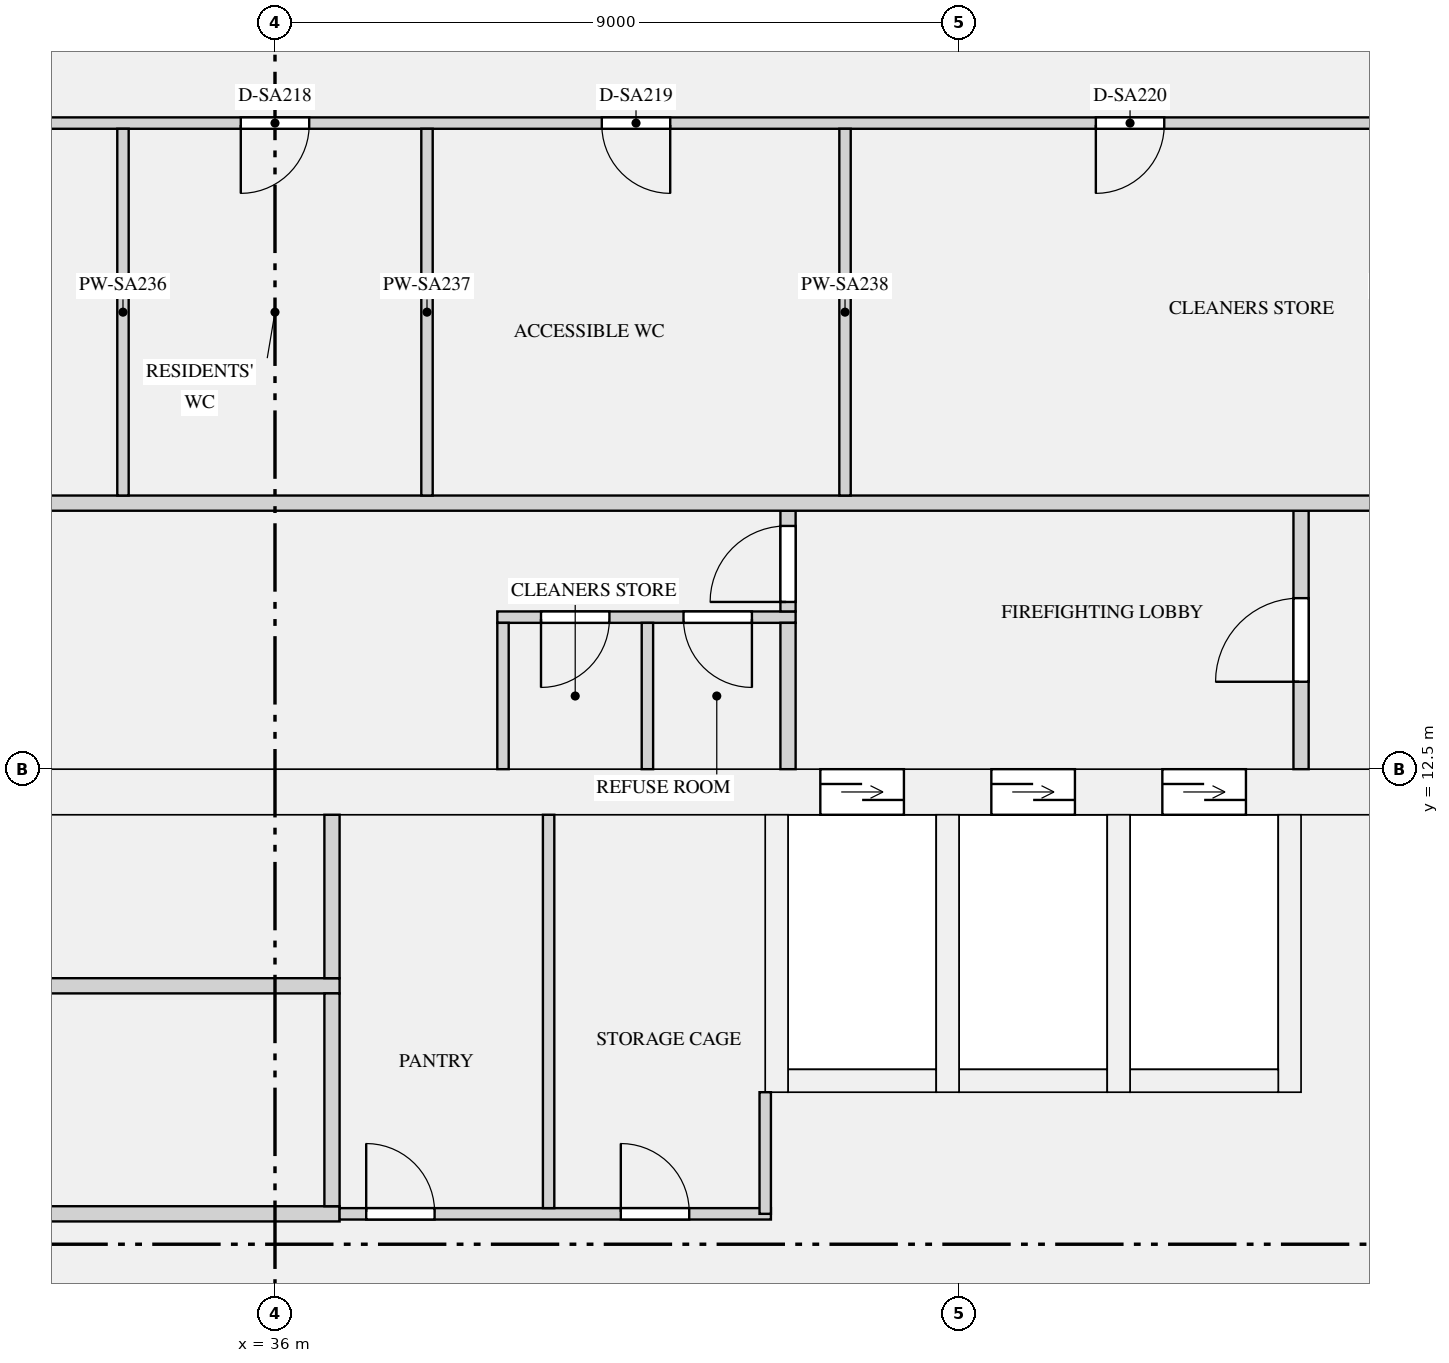
"""IFC4 building model, lengths in metres.
Left out: names, types, materials, properties, quantities, classifications, styles, units other than length and angle.
Written with IfcOpenShell. Run it as: python <this file> out.ifc"""

import sys

from ifc_helpers import new_model, si_unit, direction, frame, frame_2d, origin, place, context, subcontext, project, spatial, rectangle, extrude, element, fill, save


model = new_model("IFC4")
c1 = context("Model", 3, precision=1e-05, world=origin(), true_north=direction((0.0, 1.0)))
c2 = subcontext(c1, "Body", "Model", "MODEL_VIEW")
j1 = project(units=[si_unit("LENGTHUNIT", "METRE"), si_unit("PLANEANGLEUNIT", "RADIAN")], contexts=[c1])
p1 = place(None, origin())
s1 = spatial("IfcSite", under=j1, at=p1, CompositionType="ELEMENT")
p2 = place(p1, origin())
s2 = spatial("IfcBuilding", under=s1, at=p2, CompositionType="ELEMENT")
p3 = place(p2, frame((0.0, 0.0, 191.7)))
s3 = spatial("IfcBuildingStorey", under=s2, at=p3, CompositionType="ELEMENT", Elevation=191.7)
p4 = place(p3, frame((18.6, 12.2, 0.0), z_axis=(0.0, 0.0, 1.0), x_axis=(1.0, 0.0, 0.0)))
e1 = element("IfcWall", 1, at=p4, inside=s3, PredefinedType="SHEAR", context=c2, shape_type="SweptSolid", body=[
    extrude(rectangle(XDim=34.8, YDim=0.6, at=frame_2d((17.4, 0.0))), origin(), (0.0, 0.0, 1.0), 6.3),
])
p5 = place(p4, frame((24.575, 0.0, 0.0)))
e2 = element("IfcOpeningElement", 2, at=p5, cuts=e1, PredefinedType="OPENING", context=c2, shape_type="SweptSolid", body=[
    extrude(rectangle(XDim=1.1, YDim=2.1, at=frame_2d((0.55, 1.05))), frame((0.0, 0.31, 0.0), z_axis=(0.0, -1.0, 0.0), x_axis=(1.0, 0.0, 0.0)), (0.0, 0.0, 1.0), 0.62),
])
p6 = place(p4, frame((26.825, 0.0, 0.0)))
e3 = element("IfcOpeningElement", 3, at=p6, cuts=e1, PredefinedType="OPENING", context=c2, shape_type="SweptSolid", body=[
    extrude(rectangle(XDim=1.1, YDim=2.1, at=frame_2d((0.55, 1.05))), frame((0.0, 0.31, 0.0), z_axis=(0.0, -1.0, 0.0), x_axis=(1.0, 0.0, 0.0)), (0.0, 0.0, 1.0), 0.62),
])
p7 = place(p4, frame((29.075, 0.0, 0.0)))
e4 = element("IfcOpeningElement", 4, at=p7, cuts=e1, PredefinedType="OPENING", context=c2, shape_type="SweptSolid", body=[
    extrude(rectangle(XDim=1.1, YDim=2.1, at=frame_2d((0.55, 1.05))), frame((0.0, 0.31, 0.0), z_axis=(0.0, -1.0, 0.0), x_axis=(1.0, 0.0, 0.0)), (0.0, 0.0, 1.0), 0.62),
])
p8 = place(p4, frame((4.65, 0.0, 0.0)))
e5 = element("IfcOpeningElement", 5, at=p8, cuts=e1, PredefinedType="OPENING", context=c2, shape_type="SweptSolid", body=[
    extrude(rectangle(XDim=0.9, YDim=2.1, at=frame_2d((0.45, 1.05))), frame((0.0, 0.31, 0.0), z_axis=(0.0, -1.0, 0.0), x_axis=(1.0, 0.0, 0.0)), (0.0, 0.0, 1.0), 0.62),
])
p9 = place(p4, frame((1.55, 0.0, 0.0)))
e6 = element("IfcOpeningElement", 6, at=p9, cuts=e1, PredefinedType="OPENING", context=c2, shape_type="SweptSolid", body=[
    extrude(rectangle(XDim=1.2, YDim=2.1, at=frame_2d((0.6, 1.05))), frame((0.0, 0.31, 0.0), z_axis=(0.0, -1.0, 0.0), x_axis=(1.0, 0.0, 0.0)), (0.0, 0.0, 1.0), 0.62),
])
p10 = place(p4, frame((32.05, 0.0, 0.0)))
e7 = element("IfcOpeningElement", 7, at=p10, cuts=e1, PredefinedType="OPENING", context=c2, shape_type="SweptSolid", body=[
    extrude(rectangle(XDim=1.2, YDim=2.1, at=frame_2d((0.6, 1.05))), frame((0.0, 0.31, 0.0), z_axis=(0.0, -1.0, 0.0), x_axis=(1.0, 0.0, 0.0)), (0.0, 0.0, 1.0), 0.62),
])
p11 = place(p3, frame((42.75, 8.4, 0.0), z_axis=(0.0, 0.0, 1.0), x_axis=(1.0, 0.0, 0.0)))
e8 = element("IfcWall", 8, at=p11, inside=s3, PredefinedType="SHEAR", context=c2, shape_type="SweptSolid", body=[
    extrude(rectangle(XDim=1.95, YDim=0.3, at=frame_2d((0.975, 0.0))), origin(), (0.0, 0.0, 1.0), 6.3),
])
p12 = place(p3, frame((42.6, 8.25, 0.0), z_axis=(0.0, 0.0, 1.0), x_axis=(0.0, 1.0, 0.0)))
e9 = element("IfcWall", 9, at=p12, inside=s3, PredefinedType="SHEAR", context=c2, shape_type="SweptSolid", body=[
    extrude(rectangle(XDim=3.65, YDim=0.3, at=frame_2d((1.825, 0.0))), origin(), (0.0, 0.0, 1.0), 6.3),
])
p13 = place(p3, frame((45.0, 8.4, 0.0), z_axis=(0.0, 0.0, 1.0), x_axis=(1.0, 0.0, 0.0)))
e10 = element("IfcWall", 10, at=p13, inside=s3, PredefinedType="SHEAR", context=c2, shape_type="SweptSolid", body=[
    extrude(rectangle(XDim=1.95, YDim=0.3, at=frame_2d((0.975, 0.0))), origin(), (0.0, 0.0, 1.0), 6.3),
])
p14 = place(p3, frame((44.85, 8.25, 0.0), z_axis=(0.0, 0.0, 1.0), x_axis=(0.0, 1.0, 0.0)))
e11 = element("IfcWall", 11, at=p14, inside=s3, PredefinedType="SHEAR", context=c2, shape_type="SweptSolid", body=[
    extrude(rectangle(XDim=3.65, YDim=0.3, at=frame_2d((1.825, 0.0))), origin(), (0.0, 0.0, 1.0), 6.3),
])
p15 = place(p3, frame((47.25, 8.4, 0.0), z_axis=(0.0, 0.0, 1.0), x_axis=(1.0, 0.0, 0.0)))
e12 = element("IfcWall", 12, at=p15, inside=s3, PredefinedType="SHEAR", context=c2, shape_type="SweptSolid", body=[
    extrude(rectangle(XDim=1.95, YDim=0.3, at=frame_2d((0.975, 0.0))), origin(), (0.0, 0.0, 1.0), 6.3),
])
for number, where, z_axis, x_axis in (
    (13, (47.1, 8.25, 0.0), (0.0, 0.0, 1.0), (0.0, 1.0, 0.0)),
    (14, (49.35, 8.25, 0.0), (0.0, 0.0, 1.0), (0.0, 1.0, 0.0)),
):
    element("IfcWall", number, at=place(p3, frame(where, z_axis=z_axis, x_axis=x_axis)), inside=s3, PredefinedType="SHEAR", context=c2, shape_type="SweptSolid", body=[
        extrude(rectangle(XDim=3.65, YDim=0.3, at=frame_2d((1.825, 0.0))), origin(), (0.0, 0.0, 1.0), 6.3),
    ])
p16 = place(p3, frame((22.7, 6.65, 0.0), z_axis=(0.0, 0.0, 1.0), x_axis=(1.0, 0.0, 0.0)))
e15 = element("IfcWall", 15, at=p16, inside=s3, PredefinedType="PARTITIONING", context=c2, shape_type="SweptSolid", body=[
    extrude(rectangle(XDim=14.15, YDim=0.2, at=frame_2d((7.075, 0.0))), origin(), (0.0, 0.0, 1.0), 5.98),
])
p17 = place(p16, frame((0.55, 0.0, 0.0)))
e16 = element("IfcOpeningElement", 16, at=p17, cuts=e15, PredefinedType="OPENING", context=c2, shape_type="SweptSolid", body=[
    extrude(rectangle(XDim=0.9, YDim=2.1, at=frame_2d((0.45, 1.05))), frame((0.0, 0.11, 0.0), z_axis=(0.0, -1.0, 0.0), x_axis=(1.0, 0.0, 0.0)), (0.0, 0.0, 1.0), 0.22),
])
p18 = place(p3, frame((36.85, 6.65, 0.0), z_axis=(0.0, 0.0, 1.0), x_axis=(1.0, 0.0, 0.0)))
e17 = element("IfcWall", 17, at=p18, inside=s3, PredefinedType="PARTITIONING", context=c2, shape_type="SweptSolid", body=[
    extrude(rectangle(XDim=5.675, YDim=0.15, at=frame_2d((2.837, 0.0))), origin(), (0.0, 0.0, 1.0), 5.98),
])
p19 = place(p18, frame((0.35, 0.0, 0.0)))
e18 = element("IfcOpeningElement", 18, at=p19, cuts=e17, PredefinedType="OPENING", context=c2, shape_type="SweptSolid", body=[
    extrude(rectangle(XDim=0.9, YDim=2.1, at=frame_2d((0.45, 1.05))), frame((0.0, 0.085, 0.0), z_axis=(0.0, -1.0, 0.0), x_axis=(1.0, 0.0, 0.0)), (0.0, 0.0, 1.0), 0.17),
])
p20 = place(p18, frame((3.7, 0.0, 0.0)))
e19 = element("IfcOpeningElement", 19, at=p20, cuts=e17, PredefinedType="OPENING", context=c2, shape_type="SweptSolid", body=[
    extrude(rectangle(XDim=0.9, YDim=2.1, at=frame_2d((0.45, 1.05))), frame((0.0, 0.085, 0.0), z_axis=(0.0, -1.0, 0.0), x_axis=(1.0, 0.0, 0.0)), (0.0, 0.0, 1.0), 0.17),
])
p21 = place(p3, frame((22.7, 9.65, 0.0), z_axis=(0.0, 0.0, 1.0), x_axis=(1.0, 0.0, 0.0)))
e20 = element("IfcWall", 20, at=p21, inside=s3, PredefinedType="PARTITIONING", context=c2, shape_type="SweptSolid", body=[
    extrude(rectangle(XDim=14.15, YDim=0.2, at=frame_2d((7.075, 0.0))), origin(), (0.0, 0.0, 1.0), 5.98),
])
p22 = place(p3, frame((38.925, 14.5, 0.0), z_axis=(0.0, 0.0, 1.0), x_axis=(1.0, 0.0, 0.0)))
e21 = element("IfcWall", 21, at=p22, inside=s3, PredefinedType="PARTITIONING", context=c2, shape_type="SweptSolid", body=[
    extrude(rectangle(XDim=3.925, YDim=0.15, at=frame_2d((1.962, 0.0))), origin(), (0.0, 0.0, 1.0), 5.98),
])
p23 = place(p22, frame((0.575, 0.0, 0.0)))
e22 = element("IfcOpeningElement", 22, at=p23, cuts=e21, PredefinedType="OPENING", context=c2, shape_type="SweptSolid", body=[
    extrude(rectangle(XDim=0.9, YDim=2.1, at=frame_2d((0.45, 1.05))), frame((0.0, 0.085, 0.0), z_axis=(0.0, -1.0, 0.0), x_axis=(1.0, 0.0, 0.0)), (0.0, 0.0, 1.0), 0.17),
])
p24 = place(p22, frame((2.45, 0.0, 0.0)))
e23 = element("IfcOpeningElement", 23, at=p24, cuts=e21, PredefinedType="OPENING", context=c2, shape_type="SweptSolid", body=[
    extrude(rectangle(XDim=0.9, YDim=2.1, at=frame_2d((0.45, 1.05))), frame((0.0, 0.085, 0.0), z_axis=(0.0, -1.0, 0.0), x_axis=(1.0, 0.0, 0.0)), (0.0, 0.0, 1.0), 0.17),
])
p25 = place(p3, frame((42.45, 6.65, 0.0), z_axis=(0.0, 0.0, 1.0), x_axis=(0.0, 1.0, 0.0)))
e24 = element("IfcWall", 24, at=p25, inside=s3, PredefinedType="PARTITIONING", context=c2, shape_type="SweptSolid", body=[
    extrude(rectangle(XDim=1.6, YDim=0.15, at=frame_2d((0.8, 0.0))), origin(), (0.0, 0.0, 1.0), 5.98),
])
p26 = place(p3, frame((39.6, 6.725, 0.0), z_axis=(0.0, 0.0, 1.0), x_axis=(0.0, 1.0, 0.0)))
e25 = element("IfcWall", 25, at=p26, inside=s3, PredefinedType="PARTITIONING", context=c2, shape_type="SweptSolid", body=[
    extrude(rectangle(XDim=5.175, YDim=0.15, at=frame_2d((2.587, 0.0))), origin(), (0.0, 0.0, 1.0), 5.98),
])
p27 = place(p3, frame((36.75, 6.75, 0.0), z_axis=(0.0, 0.0, 1.0), x_axis=(0.0, 1.0, 0.0)))
e26 = element("IfcWall", 26, at=p27, inside=s3, PredefinedType="PARTITIONING", context=c2, shape_type="SweptSolid", body=[
    extrude(rectangle(XDim=2.8, YDim=0.2, at=frame_2d((1.4, 0.0))), origin(), (0.0, 0.0, 1.0), 5.98),
])
p28 = place(p3, frame((36.75, 9.75, 0.0), z_axis=(0.0, 0.0, 1.0), x_axis=(0.0, 1.0, 0.0)))
e27 = element("IfcWall", 27, at=p28, inside=s3, PredefinedType="PARTITIONING", context=c2, shape_type="SweptSolid", body=[
    extrude(rectangle(XDim=2.15, YDim=0.2, at=frame_2d((1.075, 0.0))), origin(), (0.0, 0.0, 1.0), 5.98),
])
for number, where, z_axis, x_axis in (
    (28, (39.0, 12.5, 0.0), (0.0, 0.0, 1.0), (0.0, 1.0, 0.0)),
    (29, (40.9, 12.5, 0.0), (0.0, 0.0, 1.0), (0.0, 1.0, 0.0)),
):
    element("IfcWall", number, at=place(p3, frame(where, z_axis=z_axis, x_axis=x_axis)), inside=s3, PredefinedType="PARTITIONING", context=c2, shape_type="SweptSolid", body=[
        extrude(rectangle(XDim=1.925, YDim=0.15, at=frame_2d((0.962, 0.0))), origin(), (0.0, 0.0, 1.0), 5.98),
    ])
p29 = place(p3, frame((42.75, 12.5, 0.0), z_axis=(0.0, 0.0, 1.0), x_axis=(0.0, 1.0, 0.0)))
e30 = element("IfcWall", 30, at=p29, inside=s3, PredefinedType="PARTITIONING", context=c2, shape_type="SweptSolid", body=[
    extrude(rectangle(XDim=1.925, YDim=0.2, at=frame_2d((0.962, 0.0))), origin(), (0.0, 0.0, 1.0), 5.98),
])
p30 = place(p3, frame((49.5, 12.5, 0.0), z_axis=(0.0, 0.0, 1.0), x_axis=(0.0, 1.0, 0.0)))
e31 = element("IfcWall", 31, at=p30, inside=s3, PredefinedType="PARTITIONING", context=c2, shape_type="SweptSolid", body=[
    extrude(rectangle(XDim=3.4, YDim=0.2, at=frame_2d((1.7, 0.0))), origin(), (0.0, 0.0, 1.0), 5.98),
])
p31 = place(p30, frame((1.15, 0.0, 0.0)))
e32 = element("IfcOpeningElement", 32, at=p31, cuts=e31, PredefinedType="OPENING", context=c2, shape_type="SweptSolid", body=[
    extrude(rectangle(XDim=1.1, YDim=2.1, at=frame_2d((0.55, 1.05))), frame((0.0, 0.11, 0.0), z_axis=(0.0, -1.0, 0.0), x_axis=(1.0, 0.0, 0.0)), (0.0, 0.0, 1.0), 0.22),
])
p32 = place(p3, frame((42.75, 14.575, 0.0), z_axis=(0.0, 0.0, 1.0), x_axis=(0.0, 1.0, 0.0)))
e33 = element("IfcWall", 33, at=p32, inside=s3, PredefinedType="PARTITIONING", context=c2, shape_type="SweptSolid", body=[
    extrude(rectangle(XDim=1.325, YDim=0.2, at=frame_2d((0.663, 0.0))), origin(), (0.0, 0.0, 1.0), 5.98),
])
p33 = place(p32, frame((0.125, 0.0, 0.0)))
e34 = element("IfcOpeningElement", 34, at=p33, cuts=e33, PredefinedType="OPENING", context=c2, shape_type="SweptSolid", body=[
    extrude(rectangle(XDim=1.0, YDim=2.1, at=frame_2d((0.5, 1.05))), frame((0.0, 0.11, 0.0), z_axis=(0.0, -1.0, 0.0), x_axis=(1.0, 0.0, 0.0)), (0.0, 0.0, 1.0), 0.22),
])
p34 = place(p3, frame((20.925, 21.0, 0.0), z_axis=(0.0, 0.0, 1.0), x_axis=(1.0, 0.0, 0.0)))
e35 = element("IfcWall", 35, at=p34, inside=s3, PredefinedType="PARTITIONING", context=c2, shape_type="SweptSolid", body=[
    extrude(rectangle(XDim=30.15, YDim=0.15, at=frame_2d((15.075, 0.0))), origin(), (0.0, 0.0, 1.0), 5.98),
])
p35 = place(p34, frame((8.375, 0.0, 0.0)))
e36 = element("IfcOpeningElement", 36, at=p35, cuts=e35, PredefinedType="OPENING", context=c2, shape_type="SweptSolid", body=[
    extrude(rectangle(XDim=0.9, YDim=2.1, at=frame_2d((0.45, 1.05))), frame((0.0, 0.085, 0.0), z_axis=(0.0, -1.0, 0.0), x_axis=(1.0, 0.0, 0.0)), (0.0, 0.0, 1.0), 0.17),
])
p36 = place(p34, frame((14.625, 0.0, 0.0)))
e37 = element("IfcOpeningElement", 37, at=p36, cuts=e35, PredefinedType="OPENING", context=c2, shape_type="SweptSolid", body=[
    extrude(rectangle(XDim=0.9, YDim=2.1, at=frame_2d((0.45, 1.05))), frame((0.0, 0.085, 0.0), z_axis=(0.0, -1.0, 0.0), x_axis=(1.0, 0.0, 0.0)), (0.0, 0.0, 1.0), 0.17),
])
p37 = place(p34, frame((19.375, 0.0, 0.0)))
e38 = element("IfcOpeningElement", 38, at=p37, cuts=e35, PredefinedType="OPENING", context=c2, shape_type="SweptSolid", body=[
    extrude(rectangle(XDim=0.9, YDim=2.1, at=frame_2d((0.45, 1.05))), frame((0.0, 0.085, 0.0), z_axis=(0.0, -1.0, 0.0), x_axis=(1.0, 0.0, 0.0)), (0.0, 0.0, 1.0), 0.17),
])
p38 = place(p34, frame((25.875, 0.0, 0.0)))
e39 = element("IfcOpeningElement", 39, at=p38, cuts=e35, PredefinedType="OPENING", context=c2, shape_type="SweptSolid", body=[
    extrude(rectangle(XDim=0.9, YDim=2.1, at=frame_2d((0.45, 1.05))), frame((0.0, 0.085, 0.0), z_axis=(0.0, -1.0, 0.0), x_axis=(1.0, 0.0, 0.0)), (0.0, 0.0, 1.0), 0.17),
])
p39 = place(p3, frame((17.925, 16.0, 0.0), z_axis=(0.0, 0.0, 1.0), x_axis=(1.0, 0.0, 0.0)))
e40 = element("IfcWall", 40, at=p39, inside=s3, PredefinedType="PARTITIONING", context=c2, shape_type="SweptSolid", body=[
    extrude(rectangle(XDim=36.15, YDim=0.2, at=frame_2d((18.075, 0.0))), origin(), (0.0, 0.0, 1.0), 5.98),
])
p40 = place(p39, frame((0.875, 0.0, 0.0)))
e41 = element("IfcOpeningElement", 41, at=p40, cuts=e40, PredefinedType="OPENING", context=c2, shape_type="SweptSolid", body=[
    extrude(rectangle(XDim=1.4, YDim=2.1, at=frame_2d((0.7, 1.05))), frame((0.0, 0.11, 0.0), z_axis=(0.0, -1.0, 0.0), x_axis=(1.0, 0.0, 0.0)), (0.0, 0.0, 1.0), 0.22),
])
p41 = place(p39, frame((33.875, 0.0, 0.0)))
e42 = element("IfcOpeningElement", 42, at=p41, cuts=e40, PredefinedType="OPENING", context=c2, shape_type="SweptSolid", body=[
    extrude(rectangle(XDim=1.4, YDim=2.1, at=frame_2d((0.7, 1.05))), frame((0.0, 0.11, 0.0), z_axis=(0.0, -1.0, 0.0), x_axis=(1.0, 0.0, 0.0)), (0.0, 0.0, 1.0), 0.22),
])
for number, where, z_axis, x_axis in (
    (43, (34.0, 16.1, 0.0), (0.0, 0.0, 1.0), (0.0, 1.0, 0.0)),
    (44, (38.0, 16.1, 0.0), (0.0, 0.0, 1.0), (0.0, 1.0, 0.0)),
    (45, (43.5, 16.1, 0.0), (0.0, 0.0, 1.0), (0.0, 1.0, 0.0)),
):
    element("IfcWall", number, at=place(p3, frame(where, z_axis=z_axis, x_axis=x_axis)), inside=s3, PredefinedType="PARTITIONING", context=c2, shape_type="SweptSolid", body=[
        extrude(rectangle(XDim=4.825, YDim=0.15, at=frame_2d((2.413, 0.0))), origin(), (0.0, 0.0, 1.0), 5.98),
    ])
p42 = place(p5, origin())
e46 = element("IfcDoor", 46, at=p42, inside=s3, OperationType="DOUBLE_DOOR_SLIDING", PredefinedType="DOOR", context=c2, shape_type="SweptSolid", body=[
    extrude(rectangle(XDim=1.1, YDim=2.1, at=frame_2d((0.55, 1.05))), frame((0.0, 0.025, 0.0), z_axis=(0.0, -1.0, 0.0), x_axis=(1.0, 0.0, 0.0)), (0.0, 0.0, 1.0), 0.05),
])
fill(e2, e46)
p43 = place(p6, origin())
e47 = element("IfcDoor", 47, at=p43, inside=s3, OperationType="DOUBLE_DOOR_SLIDING", PredefinedType="DOOR", context=c2, shape_type="SweptSolid", body=[
    extrude(rectangle(XDim=1.1, YDim=2.1, at=frame_2d((0.55, 1.05))), frame((0.0, 0.025, 0.0), z_axis=(0.0, -1.0, 0.0), x_axis=(1.0, 0.0, 0.0)), (0.0, 0.0, 1.0), 0.05),
])
fill(e3, e47)
p44 = place(p7, origin())
e48 = element("IfcDoor", 48, at=p44, inside=s3, OperationType="DOUBLE_DOOR_SLIDING", PredefinedType="DOOR", context=c2, shape_type="SweptSolid", body=[
    extrude(rectangle(XDim=1.1, YDim=2.1, at=frame_2d((0.55, 1.05))), frame((0.0, 0.025, 0.0), z_axis=(0.0, -1.0, 0.0), x_axis=(1.0, 0.0, 0.0)), (0.0, 0.0, 1.0), 0.05),
])
fill(e4, e48)
p45 = place(p23, frame((0.9, 0.0, 0.0), z_axis=(0.0, 0.0, 1.0), x_axis=(-1.0, 0.0, 0.0)))
e49 = element("IfcDoor", 49, at=p45, inside=s3, OperationType="SINGLE_SWING_RIGHT", PredefinedType="DOOR", context=c2, shape_type="SweptSolid", body=[
    extrude(rectangle(XDim=0.9, YDim=2.1, at=frame_2d((0.45, 1.05))), frame((0.0, 0.025, 0.0), z_axis=(0.0, -1.0, 0.0), x_axis=(1.0, 0.0, 0.0)), (0.0, 0.0, 1.0), 0.05),
])
fill(e22, e49)
p46 = place(p24, frame((0.9, 0.0, 0.0), z_axis=(0.0, 0.0, 1.0), x_axis=(-1.0, 0.0, 0.0)))
e50 = element("IfcDoor", 50, at=p46, inside=s3, OperationType="SINGLE_SWING_LEFT", PredefinedType="DOOR", context=c2, shape_type="SweptSolid", body=[
    extrude(rectangle(XDim=0.9, YDim=2.1, at=frame_2d((0.45, 1.05))), frame((0.0, 0.025, 0.0), z_axis=(0.0, -1.0, 0.0), x_axis=(1.0, 0.0, 0.0)), (0.0, 0.0, 1.0), 0.05),
])
fill(e23, e50)
p47 = place(p19, origin())
e51 = element("IfcDoor", 51, at=p47, inside=s3, OperationType="SINGLE_SWING_LEFT", PredefinedType="DOOR", context=c2, shape_type="SweptSolid", body=[
    extrude(rectangle(XDim=0.9, YDim=2.1, at=frame_2d((0.45, 1.05))), frame((0.0, 0.025, 0.0), z_axis=(0.0, -1.0, 0.0), x_axis=(1.0, 0.0, 0.0)), (0.0, 0.0, 1.0), 0.05),
])
fill(e18, e51)
p48 = place(p20, origin())
e52 = element("IfcDoor", 52, at=p48, inside=s3, OperationType="SINGLE_SWING_LEFT", PredefinedType="DOOR", context=c2, shape_type="SweptSolid", body=[
    extrude(rectangle(XDim=0.9, YDim=2.1, at=frame_2d((0.45, 1.05))), frame((0.0, 0.025, 0.0), z_axis=(0.0, -1.0, 0.0), x_axis=(1.0, 0.0, 0.0)), (0.0, 0.0, 1.0), 0.05),
])
fill(e19, e52)
p49 = place(p33, origin())
e53 = element("IfcDoor", 53, at=p49, inside=s3, OperationType="SINGLE_SWING_LEFT", PredefinedType="DOOR", context=c2, shape_type="SweptSolid", body=[
    extrude(rectangle(XDim=1.0, YDim=2.1, at=frame_2d((0.5, 1.05))), frame((0.0, 0.025, 0.0), z_axis=(0.0, -1.0, 0.0), x_axis=(1.0, 0.0, 0.0)), (0.0, 0.0, 1.0), 0.05),
])
fill(e34, e53)
p50 = place(p31, origin())
e54 = element("IfcDoor", 54, at=p50, inside=s3, OperationType="SINGLE_SWING_LEFT", PredefinedType="DOOR", context=c2, shape_type="SweptSolid", body=[
    extrude(rectangle(XDim=1.1, YDim=2.1, at=frame_2d((0.55, 1.05))), frame((0.0, 0.025, 0.0), z_axis=(0.0, -1.0, 0.0), x_axis=(1.0, 0.0, 0.0)), (0.0, 0.0, 1.0), 0.05),
])
fill(e32, e54)
p51 = place(p36, frame((0.9, 0.0, 0.0), z_axis=(0.0, 0.0, 1.0), x_axis=(-1.0, 0.0, 0.0)))
e55 = element("IfcDoor", 55, at=p51, inside=s3, OperationType="SINGLE_SWING_RIGHT", PredefinedType="DOOR", context=c2, shape_type="SweptSolid", body=[
    extrude(rectangle(XDim=0.9, YDim=2.1, at=frame_2d((0.45, 1.05))), frame((0.0, 0.025, 0.0), z_axis=(0.0, -1.0, 0.0), x_axis=(1.0, 0.0, 0.0)), (0.0, 0.0, 1.0), 0.05),
])
fill(e37, e55)
p52 = place(p37, frame((0.9, 0.0, 0.0), z_axis=(0.0, 0.0, 1.0), x_axis=(-1.0, 0.0, 0.0)))
e56 = element("IfcDoor", 56, at=p52, inside=s3, OperationType="SINGLE_SWING_LEFT", PredefinedType="DOOR", context=c2, shape_type="SweptSolid", body=[
    extrude(rectangle(XDim=0.9, YDim=2.1, at=frame_2d((0.45, 1.05))), frame((0.0, 0.025, 0.0), z_axis=(0.0, -1.0, 0.0), x_axis=(1.0, 0.0, 0.0)), (0.0, 0.0, 1.0), 0.05),
])
fill(e38, e56)
p53 = place(p38, frame((0.9, 0.0, 0.0), z_axis=(0.0, 0.0, 1.0), x_axis=(-1.0, 0.0, 0.0)))
e57 = element("IfcDoor", 57, at=p53, inside=s3, OperationType="SINGLE_SWING_RIGHT", PredefinedType="DOOR", context=c2, shape_type="SweptSolid", body=[
    extrude(rectangle(XDim=0.9, YDim=2.1, at=frame_2d((0.45, 1.05))), frame((0.0, 0.025, 0.0), z_axis=(0.0, -1.0, 0.0), x_axis=(1.0, 0.0, 0.0)), (0.0, 0.0, 1.0), 0.05),
])
fill(e39, e57)
save(model, sys.argv[1])
